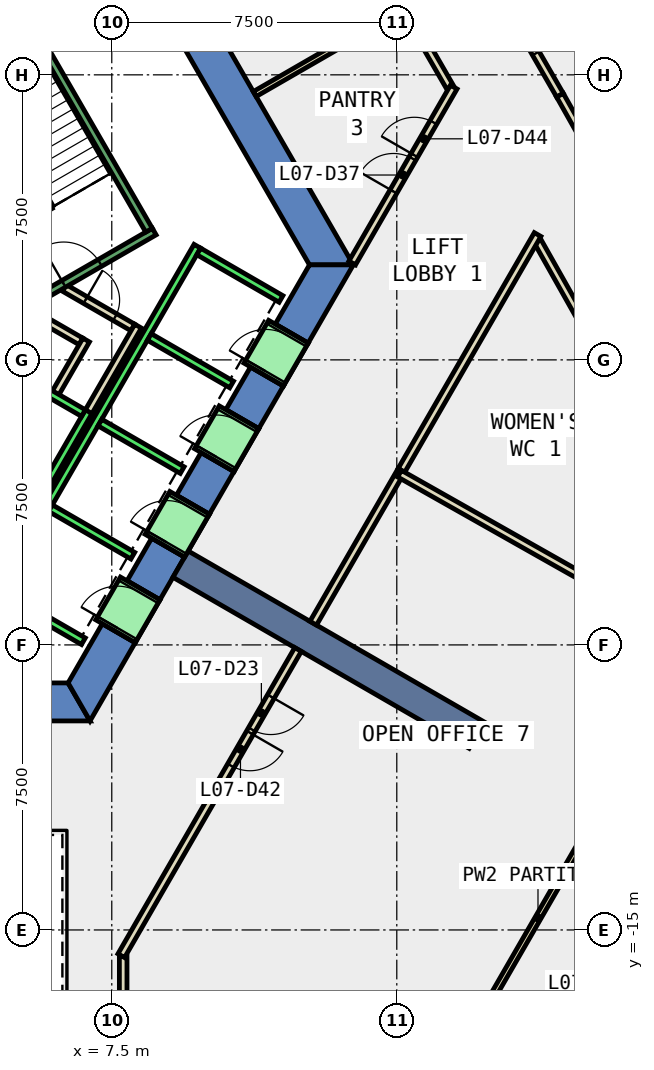
"""IFC4 building model, lengths in metres.
Left out: names, types, materials, properties, quantities, classifications, styles, units other than length and angle.
Written with IfcOpenShell. Run it as: python <this file> out.ifc"""

import sys

from ifc_helpers import new_model, si_unit, direction, frame, frame_2d, origin, place, context, subcontext, project, spatial, polyline, rectangle, outline, extrude, element, fill, save


model = new_model("IFC4")
c1 = context("Model", 3, precision=1e-05, world=origin(), true_north=direction((0.0, 1.0)))
c2 = subcontext(c1, "Body", "Model", "MODEL_VIEW")
j1 = project(units=[si_unit("LENGTHUNIT", "METRE"), si_unit("PLANEANGLEUNIT", "RADIAN")], contexts=[c1])
p1 = place(None, origin())
s1 = spatial("IfcSite", under=j1, at=p1, CompositionType="ELEMENT")
p2 = place(p1, origin())
s2 = spatial("IfcBuilding", under=s1, at=p2, CompositionType="ELEMENT")
p3 = place(p2, frame((0.0, 0.0, 39.2)))
s3 = spatial("IfcBuildingStorey", under=s2, at=p3, CompositionType="ELEMENT", Elevation=39.2)
p4 = place(p3, frame((0.0, 0.0, -0.4)))
e1 = element("IfcWall", 1, at=p4, inside=s3, PredefinedType="SHEAR", context=c2, shape_type="SweptSolid", body=[
    extrude(outline(polyline([(8.517, 11.748), (7.651, 11.248), (12.702, 2.5), (13.856, 2.5), (8.517, 11.748)])), origin(), (0.0, 0.0, 1.0), 4.2),
])
p5 = place(p3, frame((0.0, 0.0, -0.4)))
e2 = element("IfcWall", 2, at=p5, inside=s3, PredefinedType="SHEAR", context=c2, shape_type="SweptSolid", body=[
    extrude(outline(polyline([(5.75, -8.5), (5.75, -9.5), (6.928, -9.5), (6.351, -8.5), (5.75, -8.5)])), origin(), (0.0, 0.0, 1.0), 4.2),
])
p6 = place(p3, frame((0.0, 0.0, -0.4)))
e3 = element("IfcWall", 3, at=p6, inside=s3, PredefinedType="SHEAR", context=c2, shape_type="SweptSolid", body=[
    extrude(outline(polyline([(8.117, -7.44), (7.252, -6.94), (6.351, -8.5), (6.928, -9.5), (8.117, -7.44)])), origin(), (0.0, 0.0, 1.0), 4.2),
])
p7 = place(p3, frame((0.0, 0.0, -0.4)))
e4 = element("IfcWall", 4, at=p7, inside=s3, PredefinedType="SHEAR", context=c2, shape_type="SweptSolid", body=[
    extrude(outline(polyline([(9.417, -5.189), (8.551, -4.689), (7.902, -5.814), (8.767, -6.314), (9.417, -5.189)])), origin(), (0.0, 0.0, 1.0), 4.2),
])
p8 = place(p3, frame((0.0, 0.0, -0.4)))
e5 = element("IfcWall", 5, at=p8, inside=s3, PredefinedType="SHEAR", context=c2, shape_type="SweptSolid", body=[
    extrude(outline(polyline([(10.717, -2.937), (9.851, -2.437), (9.201, -3.563), (10.067, -4.063), (10.717, -2.937)])), origin(), (0.0, 0.0, 1.0), 4.2),
])
p9 = place(p3, frame((0.0, 0.0, -0.4)))
e6 = element("IfcWall", 6, at=p9, inside=s3, PredefinedType="SHEAR", context=c2, shape_type="SweptSolid", body=[
    extrude(outline(polyline([(12.017, -0.686), (11.151, -0.186), (10.501, -1.311), (11.367, -1.811), (12.017, -0.686)])), origin(), (0.0, 0.0, 1.0), 4.2),
])
p10 = place(p3, frame((0.0, 0.0, -0.4)))
e7 = element("IfcWall", 7, at=p10, inside=s3, PredefinedType="SHEAR", context=c2, shape_type="SweptSolid", body=[
    extrude(outline(polyline([(11.801, 0.94), (12.667, 0.44), (13.856, 2.5), (12.702, 2.5), (11.801, 0.94)])), origin(), (0.0, 0.0, 1.0), 4.2),
])
p11 = place(p3, frame((0.0, 0.0, 3.6)))
e8 = element("IfcWall", 8, at=p11, inside=s3, PredefinedType="SHEAR", context=c2, shape_type="SweptSolid", body=[
    extrude(outline(polyline([(8.767, -6.314), (7.902, -5.814), (7.252, -6.94), (8.117, -7.44), (8.767, -6.314)])), origin(), (0.0, 0.0, 1.0), 0.2),
])
p12 = place(p3, frame((0.0, 0.0, 3.6)))
e9 = element("IfcWall", 9, at=p12, inside=s3, PredefinedType="SHEAR", context=c2, shape_type="SweptSolid", body=[
    extrude(outline(polyline([(10.067, -4.063), (9.201, -3.563), (8.551, -4.689), (9.417, -5.189), (10.067, -4.063)])), origin(), (0.0, 0.0, 1.0), 0.2),
])
p13 = place(p3, frame((0.0, 0.0, 3.6)))
e10 = element("IfcWall", 10, at=p13, inside=s3, PredefinedType="SHEAR", context=c2, shape_type="SweptSolid", body=[
    extrude(outline(polyline([(11.367, -1.811), (10.501, -1.311), (9.851, -2.437), (10.717, -2.937), (11.367, -1.811)])), origin(), (0.0, 0.0, 1.0), 0.2),
])
p14 = place(p3, frame((0.0, 0.0, 3.6)))
e11 = element("IfcWall", 11, at=p14, inside=s3, PredefinedType="SHEAR", context=c2, shape_type="SweptSolid", body=[
    extrude(outline(polyline([(12.667, 0.44), (11.801, 0.94), (11.151, -0.186), (12.017, -0.686), (12.667, 0.44)])), origin(), (0.0, 0.0, 1.0), 0.2),
])
p15 = place(p3, frame((9.31, -5.375, -0.4), z_axis=(0.0, 0.0, 1.0), x_axis=(0.866017533419, -0.500013631625, 0.0)))
e12 = element("IfcWall", 12, at=p15, inside=s3, PredefinedType="SHEAR", context=c2, shape_type="SweptSolid", body=[
    extrude(rectangle(XDim=9.0, YDim=0.8, at=frame_2d((4.5, 0.0))), origin(), (0.0, 0.0, 1.0), 4.2),
])
p16 = place(p3, frame((16.399, 7.178, 0.0), z_axis=(0.0, 0.0, 1.0), x_axis=(-0.499873332494, 0.866098522953, 0.0)))
e13 = element("IfcWall", 13, at=p16, inside=s3, PredefinedType="PARTITIONING", context=c2, shape_type="SweptSolid", body=[
    extrude(rectangle(XDim=2.334, YDim=0.2, at=frame_2d((1.167, 0.0))), origin(), (0.0, 0.0, 1.0), 3.8),
])
p17 = place(p3, frame((20.751, -0.505, 0.0), z_axis=(0.0, 0.0, 1.0), x_axis=(-0.491284712602, 0.870999041999, 0.0)))
e14 = element("IfcWall", 14, at=p17, inside=s3, PredefinedType="PARTITIONING", context=c2, shape_type="SweptSolid", body=[
    extrude(rectangle(XDim=4.166, YDim=0.2, at=frame_2d((2.083, 0.0))), origin(), (0.0, 0.0, 1.0), 3.8),
])
p18 = place(p3, frame((17.524, 10.031, 0.0), z_axis=(0.0, 0.0, 1.0), x_axis=(0.499861717316, -0.86610522661, 0.0)))
e15 = element("IfcWall", 15, at=p18, inside=s3, PredefinedType="PARTITIONING", context=c2, shape_type="SweptSolid", body=[
    extrude(rectangle(XDim=3.541, YDim=0.2, at=frame_2d((1.771, 0.0))), origin(), (0.0, 0.0, 1.0), 3.8),
])
p19 = place(p18, frame((1.27, 0.0, 0.0)))
e16 = element("IfcOpeningElement", 16, at=p19, cuts=e15, PredefinedType="OPENING", context=c2, shape_type="SweptSolid", body=[
    extrude(rectangle(XDim=1.0, YDim=2.1, at=frame_2d((0.5, 1.05))), frame((0.0, 0.11, 0.0), z_axis=(0.0, -1.0, 0.0), x_axis=(1.0, 0.0, 0.0)), (0.0, 0.0, 1.0), 0.22),
])
p20 = place(p3, frame((19.294, 6.964, 0.0), z_axis=(0.0, 0.0, 1.0), x_axis=(0.491148159943, -0.871076050058, 0.0)))
e17 = element("IfcWall", 17, at=p20, inside=s3, PredefinedType="PARTITIONING", context=c2, shape_type="SweptSolid", body=[
    extrude(rectangle(XDim=3.541, YDim=0.2, at=frame_2d((1.771, 0.0))), origin(), (0.0, 0.0, 1.0), 3.8),
])
p21 = place(p3, frame((5.499, 1.172, 0.0), z_axis=(0.0, 0.0, 1.0), x_axis=(0.866333505267, -0.499465972466, 0.0)))
e18 = element("IfcWall", 18, at=p21, inside=s3, PredefinedType="PARTITIONING", context=c2, shape_type="SweptSolid", body=[
    extrude(rectangle(XDim=1.374, YDim=0.2, at=frame_2d((0.687, 0.0))), origin(), (0.0, 0.0, 1.0), 3.8),
])
p22 = place(p3, frame((6.826, 0.522, 0.0), z_axis=(0.0, 0.0, 1.0), x_axis=(-0.500016722714, -0.866015748706, 0.0)))
e19 = element("IfcWall", 19, at=p22, inside=s3, PredefinedType="PARTITIONING", context=c2, shape_type="SweptSolid", body=[
    extrude(rectangle(XDim=1.7, YDim=0.2, at=frame_2d((0.85, 0.0))), origin(), (0.0, 0.0, 1.0), 3.8),
])
p23 = place(p3, frame((6.25, 1.894, 0.0), z_axis=(0.0, 0.0, 1.0), x_axis=(0.866043184279, -0.499969202016, 0.0)))
e20 = element("IfcWall", 20, at=p23, inside=s3, PredefinedType="PARTITIONING", context=c2, shape_type="SweptSolid", body=[
    extrude(rectangle(XDim=2.084, YDim=0.2, at=frame_2d((1.042, 0.0))), origin(), (0.0, 0.0, 1.0), 3.8),
])
p24 = place(p23, frame((0.642, 0.0, 0.0)))
e21 = element("IfcOpeningElement", 21, at=p24, cuts=e20, PredefinedType="OPENING", context=c2, shape_type="SweptSolid", body=[
    extrude(rectangle(XDim=0.9, YDim=2.1, at=frame_2d((0.45, 1.05))), frame((0.0, 0.11, 0.0), z_axis=(0.0, -1.0, 0.0), x_axis=(1.0, 0.0, 0.0)), (0.0, 0.0, 1.0), 0.22),
])
p25 = place(p3, frame((8.192, 0.888, 0.0), z_axis=(0.0, 0.0, 1.0), x_axis=(-0.499940625693, -0.866059680843, 0.0)))
e22 = element("IfcWall", 22, at=p25, inside=s3, PredefinedType="PARTITIONING", context=c2, shape_type="SweptSolid", body=[
    extrude(rectangle(XDim=2.68, YDim=0.2, at=frame_2d((1.34, 0.0))), origin(), (0.0, 0.0, 1.0), 3.8),
])
p26 = place(p3, frame((15.281, 9.315, 0.0), z_axis=(0.0, 0.0, 1.0), x_axis=(-0.86601742213, -0.500013824377, 0.0)))
e23 = element("IfcWall", 23, at=p26, inside=s3, PredefinedType="PARTITIONING", context=c2, shape_type="SweptSolid", body=[
    extrude(rectangle(XDim=4.642, YDim=0.15, at=frame_2d((2.321, 0.0))), origin(), (0.0, 0.0, 1.0), 3.8),
])
p27 = place(p3, frame((13.827, 2.55, 0.0), z_axis=(0.0, 0.0, 1.0), x_axis=(0.50002563942, 0.866010600352, 0.0)))
e24 = element("IfcWall", 24, at=p27, inside=s3, PredefinedType="PARTITIONING", context=c2, shape_type="SweptSolid", body=[
    extrude(rectangle(XDim=5.344, YDim=0.2, at=frame_2d((2.672, 0.0))), origin(), (0.0, 0.0, 1.0), 3.8),
])
p28 = place(p27, frame((2.172, 0.0, 0.0)))
e25 = element("IfcOpeningElement", 25, at=p28, cuts=e24, PredefinedType="OPENING", context=c2, shape_type="SweptSolid", body=[
    extrude(rectangle(XDim=1.0, YDim=2.1, at=frame_2d((0.5, 1.05))), frame((0.0, 0.11, 0.0), z_axis=(0.0, -1.0, 0.0), x_axis=(1.0, 0.0, 0.0)), (0.0, 0.0, 1.0), 0.22),
])
p29 = place(p27, frame((3.272, 0.0, 0.0)))
e26 = element("IfcOpeningElement", 26, at=p29, cuts=e24, PredefinedType="OPENING", context=c2, shape_type="SweptSolid", body=[
    extrude(rectangle(XDim=1.0, YDim=2.1, at=frame_2d((0.5, 1.05))), frame((0.0, 0.11, 0.0), z_axis=(0.0, -1.0, 0.0), x_axis=(1.0, 0.0, 0.0)), (0.0, 0.0, 1.0), 0.22),
])
p30 = place(p3, frame((7.8, -15.69, 0.0), z_axis=(0.0, 0.0, 1.0), x_axis=(0.0, -1.0, 0.0)))
e27 = element("IfcWall", 27, at=p30, inside=s3, PredefinedType="PARTITIONING", context=c2, shape_type="SweptSolid", body=[
    extrude(rectangle(XDim=1.967, YDim=0.2, at=frame_2d((0.983, 0.0))), origin(), (0.0, 0.0, 1.0), 3.8),
])
p31 = place(p3, frame((15.122, -2.908, 0.0), z_axis=(0.0, 0.0, 1.0), x_axis=(-0.499922740561, -0.866070004948, 0.0)))
e28 = element("IfcWall", 28, at=p31, inside=s3, PredefinedType="PARTITIONING", context=c2, shape_type="SweptSolid", body=[
    extrude(rectangle(XDim=4.643, YDim=0.2, at=frame_2d((2.321, 0.0))), origin(), (0.0, 0.0, 1.0), 3.8),
])
p32 = place(p3, frame((18.705, 3.298, 0.0), z_axis=(0.0, 0.0, 1.0), x_axis=(-0.499993769413, -0.866029000986, 0.0)))
e29 = element("IfcWall", 29, at=p32, inside=s3, PredefinedType="PARTITIONING", context=c2, shape_type="SweptSolid", body=[
    extrude(rectangle(XDim=7.166, YDim=0.2, at=frame_2d((3.583, 0.0))), origin(), (0.0, 0.0, 1.0), 3.8),
])
p33 = place(p3, frame((15.072, -2.994, 0.0), z_axis=(0.0, 0.0, 1.0), x_axis=(0.87054185148, -0.49209438609, 0.0)))
e30 = element("IfcWall", 30, at=p33, inside=s3, PredefinedType="PARTITIONING", context=c2, shape_type="SweptSolid", body=[
    extrude(rectangle(XDim=9.1, YDim=0.2, at=frame_2d((4.55, 0.0))), origin(), (0.0, 0.0, 1.0), 3.8),
])
p34 = place(p3, frame((20.445, -11.688, 0.0), z_axis=(0.0, 0.0, 1.0), x_axis=(-0.500010633597, -0.866019264387, 0.0)))
e31 = element("IfcWall", 31, at=p34, inside=s3, PredefinedType="PARTITIONING", context=c2, shape_type="SweptSolid", body=[
    extrude(rectangle(XDim=6.918, YDim=0.15, at=frame_2d((3.459, 0.0))), origin(), (0.0, 0.0, 1.0), 3.8),
])
p35 = place(p3, frame((12.401, -7.621, 0.0), z_axis=(0.0, 0.0, 1.0), x_axis=(-0.499983724212, -0.866034800411, 0.0)))
e32 = element("IfcWall", 32, at=p35, inside=s3, PredefinedType="PARTITIONING", context=c2, shape_type="SweptSolid", body=[
    extrude(rectangle(XDim=9.302, YDim=0.2, at=frame_2d((4.651, 0.0))), origin(), (0.0, 0.0, 1.0), 3.8),
])
p36 = place(p35, frame((1.429, 0.0, 0.0)))
e33 = element("IfcOpeningElement", 33, at=p36, cuts=e32, PredefinedType="OPENING", context=c2, shape_type="SweptSolid", body=[
    extrude(rectangle(XDim=1.0, YDim=2.1, at=frame_2d((0.5, 1.05))), frame((0.0, 0.11, 0.0), z_axis=(0.0, -1.0, 0.0), x_axis=(1.0, 0.0, 0.0)), (0.0, 0.0, 1.0), 0.22),
])
p37 = place(p35, frame((2.529, 0.0, 0.0)))
e34 = element("IfcOpeningElement", 34, at=p37, cuts=e32, PredefinedType="OPENING", context=c2, shape_type="SweptSolid", body=[
    extrude(rectangle(XDim=1.0, YDim=2.1, at=frame_2d((0.5, 1.05))), frame((0.0, 0.11, 0.0), z_axis=(0.0, -1.0, 0.0), x_axis=(1.0, 0.0, 0.0)), (0.0, 0.0, 1.0), 0.22),
])
p38 = place(p3, frame((5.492, -3.788, 0.0), z_axis=(0.0, 0.0, 1.0), x_axis=(0.500011755427, 0.866018616679, 0.0)))
e35 = element("IfcWall", 35, at=p38, inside=s3, PredefinedType="STANDARD", context=c2, shape_type="SweptSolid", body=[
    extrude(rectangle(XDim=2.8, YDim=0.2, at=frame_2d((1.4, 0.0))), origin(), (0.0, 0.0, 1.0), 3.8),
])
p39 = place(p3, frame((4.677, -0.2, 0.0), z_axis=(0.0, 0.0, 1.0), x_axis=(0.865973769406, -0.500089422704, 0.0)))
e36 = element("IfcWall", 36, at=p39, inside=s3, PredefinedType="STANDARD", context=c2, shape_type="SweptSolid", body=[
    extrude(rectangle(XDim=2.399, YDim=0.2, at=frame_2d((1.2, 0.0))), origin(), (0.0, 0.0, 1.0), 3.8),
])
p40 = place(p3, frame((4.451, -6.19, 0.0), z_axis=(0.0, 0.0, 1.0), x_axis=(0.50000090737, 0.866024879913, 0.0)))
e37 = element("IfcWall", 37, at=p40, inside=s3, PredefinedType="STANDARD", context=c2, shape_type="SweptSolid", body=[
    extrude(rectangle(XDim=10.6, YDim=0.2, at=frame_2d((5.3, 0.0))), origin(), (0.0, 0.0, 1.0), 3.8),
])
for number, where, z_axis, x_axis in (
    (38, (4.588, -6.153, 0.0), (0.0, 0.0, 1.0), (0.866, -0.5, 0.0)),
    (39, (5.888, -3.902, 0.0), (0.0, 0.0, 1.0), (0.866, -0.5, 0.0)),
    (40, (7.188, -1.65, 0.0), (0.0, 0.0, 1.0), (0.866, -0.5, 0.0)),
    (41, (8.488, 0.602, 0.0), (0.0, 0.0, 1.0), (0.866, -0.5, 0.0)),
):
    element("IfcWall", number, at=place(p3, frame(where, z_axis=z_axis, x_axis=x_axis)), inside=s3, PredefinedType="STANDARD", context=c2, shape_type="SweptSolid", body=[
        extrude(rectangle(XDim=2.5, YDim=0.2, at=frame_2d((1.25, 0.0))), origin(), (0.0, 0.0, 1.0), 3.8),
    ])
p41 = place(p3, frame((9.788, 2.853, 0.0), z_axis=(0.0, 0.0, 1.0), x_axis=(0.865998541277, -0.500046524342, 0.0)))
e42 = element("IfcWall", 42, at=p41, inside=s3, PredefinedType="STANDARD", context=c2, shape_type="SweptSolid", body=[
    extrude(rectangle(XDim=2.5, YDim=0.2, at=frame_2d((1.25, 0.0))), origin(), (0.0, 0.0, 1.0), 3.8),
])
p42 = place(p3, frame((7.598, -7.14, 0.0), z_axis=(0.0, 0.0, 1.0), x_axis=(0.500362116554, 0.865816234728, 0.0)))
e43 = element("IfcWall", 43, at=p42, inside=s3, PredefinedType="STANDARD", context=c2, shape_type="SweptSolid", body=[
    extrude(rectangle(XDim=1.299, YDim=1.2, at=frame_2d((0.65, 0.0))), origin(), (0.0, 0.0, 1.0), 2.4),
])
p43 = place(p42, frame((0.1, 0.0, 0.0)))
e44 = element("IfcOpeningElement", 44, at=p43, cuts=e43, PredefinedType="OPENING", context=c2, shape_type="SweptSolid", body=[
    extrude(rectangle(XDim=1.1, YDim=2.3, at=frame_2d((0.55, 1.15))), frame((0.0, 0.61, 0.0), z_axis=(0.0, -1.0, 0.0), x_axis=(1.0, 0.0, 0.0)), (0.0, 0.0, 1.0), 1.22),
])
p44 = place(p3, frame((8.898, -4.889, 0.0), z_axis=(0.0, 0.0, 1.0), x_axis=(0.500036693733, 0.866004217611, 0.0)))
e45 = element("IfcWall", 45, at=p44, inside=s3, PredefinedType="STANDARD", context=c2, shape_type="SweptSolid", body=[
    extrude(rectangle(XDim=1.3, YDim=1.2, at=frame_2d((0.65, 0.0))), origin(), (0.0, 0.0, 1.0), 2.4),
])
p45 = place(p44, frame((0.1, 0.0, 0.0)))
e46 = element("IfcOpeningElement", 46, at=p45, cuts=e45, PredefinedType="OPENING", context=c2, shape_type="SweptSolid", body=[
    extrude(rectangle(XDim=1.1, YDim=2.3, at=frame_2d((0.55, 1.15))), frame((0.0, 0.61, 0.0), z_axis=(0.0, -1.0, 0.0), x_axis=(1.0, 0.0, 0.0)), (0.0, 0.0, 1.0), 1.22),
])
p46 = place(p3, frame((10.198, -2.637, 0.0), z_axis=(0.0, 0.0, 1.0), x_axis=(0.49989585183, 0.866085525409, 0.0)))
e47 = element("IfcWall", 47, at=p46, inside=s3, PredefinedType="STANDARD", context=c2, shape_type="SweptSolid", body=[
    extrude(rectangle(XDim=1.3, YDim=1.2, at=frame_2d((0.65, 0.0))), origin(), (0.0, 0.0, 1.0), 2.4),
])
p47 = place(p46, frame((0.1, 0.0, 0.0)))
e48 = element("IfcOpeningElement", 48, at=p47, cuts=e47, PredefinedType="OPENING", context=c2, shape_type="SweptSolid", body=[
    extrude(rectangle(XDim=1.1, YDim=2.3, at=frame_2d((0.55, 1.15))), frame((0.0, 0.61, 0.0), z_axis=(0.0, -1.0, 0.0), x_axis=(1.0, 0.0, 0.0)), (0.0, 0.0, 1.0), 1.22),
])
p48 = place(p3, frame((11.498, -0.385, 0.0), z_axis=(0.0, 0.0, 1.0), x_axis=(0.500221244143, 0.865897630733, 0.0)))
e49 = element("IfcWall", 49, at=p48, inside=s3, PredefinedType="STANDARD", context=c2, shape_type="SweptSolid", body=[
    extrude(rectangle(XDim=1.299, YDim=1.2, at=frame_2d((0.65, 0.0))), origin(), (0.0, 0.0, 1.0), 2.4),
])
p49 = place(p48, frame((0.1, 0.0, 0.0)))
e50 = element("IfcOpeningElement", 50, at=p49, cuts=e49, PredefinedType="OPENING", context=c2, shape_type="SweptSolid", body=[
    extrude(rectangle(XDim=1.1, YDim=2.3, at=frame_2d((0.55, 1.15))), frame((0.0, 0.61, 0.0), z_axis=(0.0, -1.0, 0.0), x_axis=(1.0, 0.0, 0.0)), (0.0, 0.0, 1.0), 1.22),
])
p50 = place(p3, frame((4.806, 1.176, 0.0), z_axis=(0.0, 0.0, 1.0), x_axis=(0.866059941101, 0.499940174841, 0.0)))
e51 = element("IfcWall", 51, at=p50, inside=s3, PredefinedType="STANDARD", context=c2, shape_type="SweptSolid", body=[
    extrude(rectangle(XDim=4.4, YDim=0.2, at=frame_2d((2.2, 0.0))), origin(), (0.0, 0.0, 1.0), 3.8),
])
p51 = place(p50, frame((1.65, 0.0, 0.0)))
e52 = element("IfcOpeningElement", 52, at=p51, cuts=e51, PredefinedType="OPENING", context=c2, shape_type="SweptSolid", body=[
    extrude(rectangle(XDim=1.1, YDim=2.2, at=frame_2d((0.55, 1.1))), frame((0.0, 0.11, 0.0), z_axis=(0.0, -1.0, 0.0), x_axis=(1.0, 0.0, 0.0)), (0.0, 0.0, 1.0), 0.22),
])
p52 = place(p3, frame((8.48, 3.412, 0.0), z_axis=(0.0, 0.0, 1.0), x_axis=(-0.499978703459, 0.866037698999, 0.0)))
e53 = element("IfcWall", 53, at=p52, inside=s3, PredefinedType="STANDARD", context=c2, shape_type="SweptSolid", body=[
    extrude(rectangle(XDim=6.9, YDim=0.2, at=frame_2d((3.45, 0.0))), origin(), (0.0, 0.0, 1.0), 3.8),
])
p53 = place(p19, origin())
e54 = element("IfcDoor", 54, at=p53, inside=s3, OperationType="SINGLE_SWING_LEFT", PredefinedType="DOOR", context=c2, shape_type="SweptSolid", body=[
    extrude(rectangle(XDim=1.0, YDim=2.1, at=frame_2d((0.5, 1.05))), frame((0.0, 0.025, 0.0), z_axis=(0.0, -1.0, 0.0), x_axis=(1.0, 0.0, 0.0)), (0.0, 0.0, 1.0), 0.05),
])
fill(e16, e54)
p54 = place(p36, origin())
e55 = element("IfcDoor", 55, at=p54, inside=s3, OperationType="SINGLE_SWING_LEFT", PredefinedType="DOOR", context=c2, shape_type="SweptSolid", body=[
    extrude(rectangle(XDim=1.0, YDim=2.1, at=frame_2d((0.5, 1.05))), frame((0.0, 0.025, 0.0), z_axis=(0.0, -1.0, 0.0), x_axis=(1.0, 0.0, 0.0)), (0.0, 0.0, 1.0), 0.05),
])
fill(e33, e55)
p55 = place(p28, origin())
e56 = element("IfcDoor", 56, at=p55, inside=s3, OperationType="SINGLE_SWING_LEFT", PredefinedType="DOOR", context=c2, shape_type="SweptSolid", body=[
    extrude(rectangle(XDim=1.0, YDim=2.1, at=frame_2d((0.5, 1.05))), frame((0.0, 0.025, 0.0), z_axis=(0.0, -1.0, 0.0), x_axis=(1.0, 0.0, 0.0)), (0.0, 0.0, 1.0), 0.05),
])
fill(e25, e56)
p56 = place(p24, origin())
e57 = element("IfcDoor", 57, at=p56, inside=s3, OperationType="SINGLE_SWING_LEFT", PredefinedType="DOOR", context=c2, shape_type="SweptSolid", body=[
    extrude(rectangle(XDim=0.9, YDim=2.1, at=frame_2d((0.45, 1.05))), frame((0.0, 0.025, 0.0), z_axis=(0.0, -1.0, 0.0), x_axis=(1.0, 0.0, 0.0)), (0.0, 0.0, 1.0), 0.05),
])
fill(e21, e57)
p57 = place(p37, origin())
e58 = element("IfcDoor", 58, at=p57, inside=s3, OperationType="SINGLE_SWING_RIGHT", PredefinedType="DOOR", context=c2, shape_type="SweptSolid", body=[
    extrude(rectangle(XDim=1.0, YDim=2.1, at=frame_2d((0.5, 1.05))), frame((0.0, 0.025, 0.0), z_axis=(0.0, -1.0, 0.0), x_axis=(1.0, 0.0, 0.0)), (0.0, 0.0, 1.0), 0.05),
])
fill(e34, e58)
p58 = place(p29, origin())
e59 = element("IfcDoor", 59, at=p58, inside=s3, OperationType="SINGLE_SWING_RIGHT", PredefinedType="DOOR", context=c2, shape_type="SweptSolid", body=[
    extrude(rectangle(XDim=1.0, YDim=2.1, at=frame_2d((0.5, 1.05))), frame((0.0, 0.025, 0.0), z_axis=(0.0, -1.0, 0.0), x_axis=(1.0, 0.0, 0.0)), (0.0, 0.0, 1.0), 0.05),
])
fill(e26, e59)
p59 = place(p43, origin())
e60 = element("IfcDoor", 60, at=p59, inside=s3, OperationType="SLIDING_TO_LEFT", PredefinedType="DOOR", context=c2, shape_type="SweptSolid", body=[
    extrude(rectangle(XDim=1.1, YDim=2.3, at=frame_2d((0.55, 1.15))), frame((0.0, 0.025, 0.0), z_axis=(0.0, -1.0, 0.0), x_axis=(1.0, 0.0, 0.0)), (0.0, 0.0, 1.0), 0.05),
])
fill(e44, e60)
p60 = place(p45, origin())
e61 = element("IfcDoor", 61, at=p60, inside=s3, OperationType="SLIDING_TO_LEFT", PredefinedType="DOOR", context=c2, shape_type="SweptSolid", body=[
    extrude(rectangle(XDim=1.1, YDim=2.3, at=frame_2d((0.55, 1.15))), frame((0.0, 0.025, 0.0), z_axis=(0.0, -1.0, 0.0), x_axis=(1.0, 0.0, 0.0)), (0.0, 0.0, 1.0), 0.05),
])
fill(e46, e61)
p61 = place(p47, origin())
e62 = element("IfcDoor", 62, at=p61, inside=s3, OperationType="SLIDING_TO_LEFT", PredefinedType="DOOR", context=c2, shape_type="SweptSolid", body=[
    extrude(rectangle(XDim=1.1, YDim=2.3, at=frame_2d((0.55, 1.15))), frame((0.0, 0.025, 0.0), z_axis=(0.0, -1.0, 0.0), x_axis=(1.0, 0.0, 0.0)), (0.0, 0.0, 1.0), 0.05),
])
fill(e48, e62)
p62 = place(p49, origin())
e63 = element("IfcDoor", 63, at=p62, inside=s3, OperationType="SLIDING_TO_LEFT", PredefinedType="DOOR", context=c2, shape_type="SweptSolid", body=[
    extrude(rectangle(XDim=1.1, YDim=2.3, at=frame_2d((0.55, 1.15))), frame((0.0, 0.025, 0.0), z_axis=(0.0, -1.0, 0.0), x_axis=(1.0, 0.0, 0.0)), (0.0, 0.0, 1.0), 0.05),
])
fill(e50, e63)
p63 = place(p51, origin())
e64 = element("IfcDoor", 64, at=p63, inside=s3, OperationType="SINGLE_SWING_LEFT", PredefinedType="DOOR", context=c2, shape_type="SweptSolid", body=[
    extrude(rectangle(XDim=1.1, YDim=2.2, at=frame_2d((0.55, 1.1))), frame((0.0, 0.025, 0.0), z_axis=(0.0, -1.0, 0.0), x_axis=(1.0, 0.0, 0.0)), (0.0, 0.0, 1.0), 0.05),
])
fill(e52, e64)
save(model, sys.argv[1])
